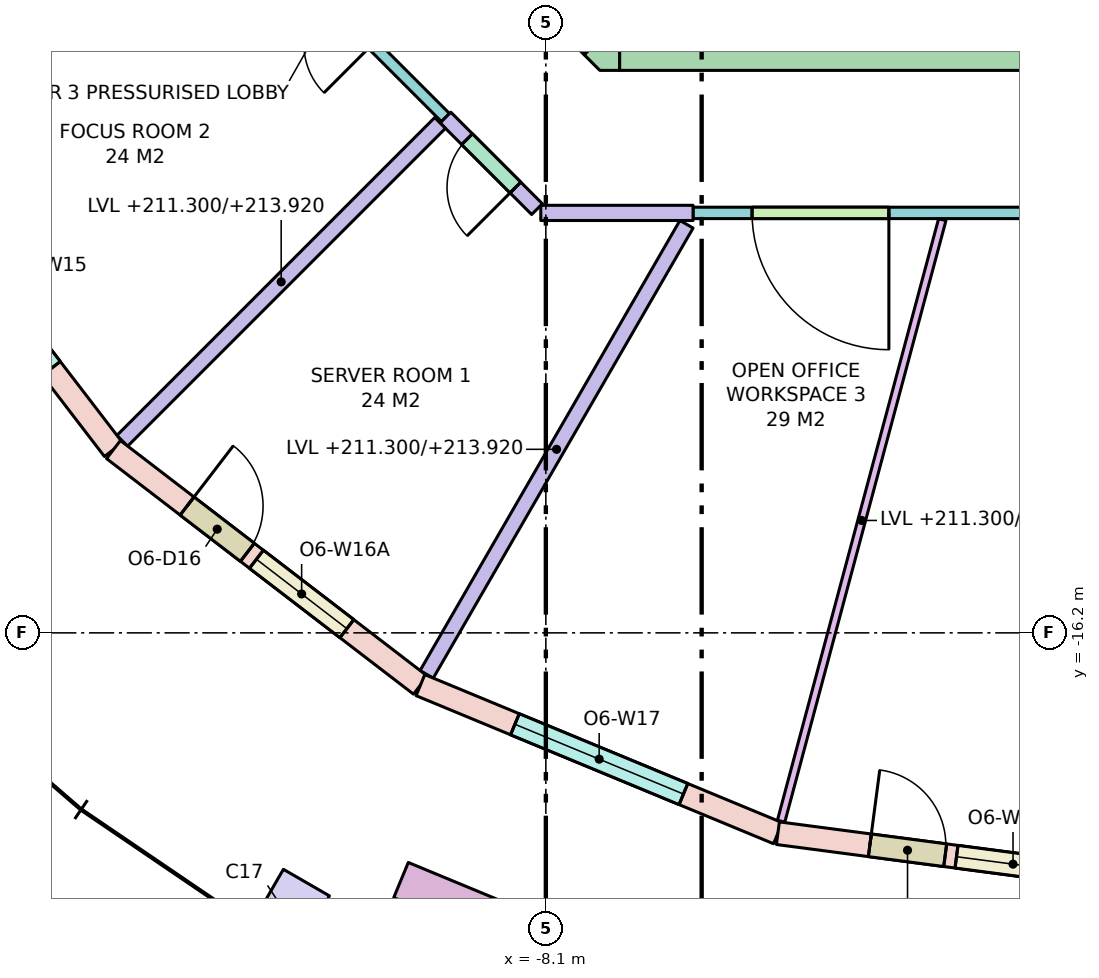
"""IFC4 building model, lengths in metres.
Left out: names, types, materials, properties, quantities, classifications, styles, units other than length and angle.
Written with IfcOpenShell. Run it as: python <this file> out.ifc"""

import sys

from ifc_helpers import new_model, si_unit, direction, frame, frame_2d, origin, origin_2d, place, context, subcontext, project, spatial, polyline, rectangle, outline, extrude, element, fill, save


model = new_model("IFC4")
c1 = context("Model", 3, precision=1e-05, world=origin(), true_north=direction((0.0, 1.0)))
c2 = subcontext(c1, "Body", "Model", "MODEL_VIEW")
j1 = project(units=[si_unit("LENGTHUNIT", "METRE"), si_unit("PLANEANGLEUNIT", "RADIAN")], contexts=[c1])
p1 = place(None, origin())
s1 = spatial("IfcSite", under=j1, at=p1, CompositionType="ELEMENT")
p2 = place(p1, origin())
s2 = spatial("IfcBuilding", under=s1, at=p2, CompositionType="ELEMENT")
p3 = place(p2, frame((0.0, 0.0, 211.3)))
s3 = spatial("IfcBuildingStorey", under=s2, at=p3, CompositionType="ELEMENT", Elevation=211.3)
p4 = place(p3, frame((-11.5, -19.919, 0.0), z_axis=(0.0, 0.0, 1.0), x_axis=(0.866025403784, -0.5, 0.0)))
e1 = element("IfcColumn", 1, at=p4, inside=s3, PredefinedType="COLUMN", context=c2, shape_type="SweptSolid", body=[
    extrude(rectangle(XDim=0.7, YDim=1.0, at=origin_2d()), origin(), (0.0, 0.0, 1.0), 3.7),
])
p5 = place(p3, frame((-7.13, -8.45, -0.28), z_axis=(0.0, 0.0, 1.0), x_axis=(1.0, 0.0, 0.0)))
e2 = element("IfcWall", 2, at=p5, inside=s3, PredefinedType="SHEAR", context=c2, shape_type="SweptSolid", body=[
    extrude(rectangle(XDim=14.26, YDim=0.7, at=frame_2d((7.13, 0.0))), origin(), (0.0, 0.0, 1.0), 3.7),
])
p6 = place(p5, frame((8.08, 0.0, 0.28)))
e3 = element("IfcOpeningElement", 3, at=p6, cuts=e2, PredefinedType="OPENING", context=c2, shape_type="SweptSolid", body=[
    extrude(rectangle(XDim=0.7, YDim=2.1, at=frame_2d((0.35, 1.05))), frame((0.0, 0.36, 0.0), z_axis=(0.0, -1.0, 0.0), x_axis=(1.0, 0.0, 0.0)), (0.0, 0.0, 1.0), 0.72),
])
p7 = place(p5, frame((5.58, 0.0, 0.28)))
e4 = element("IfcOpeningElement", 4, at=p7, cuts=e2, PredefinedType="OPENING", context=c2, shape_type="SweptSolid", body=[
    extrude(rectangle(XDim=0.85, YDim=2.1, at=frame_2d((0.425, 1.05))), frame((0.0, 0.36, 0.0), z_axis=(0.0, -1.0, 0.0), x_axis=(1.0, 0.0, 0.0)), (0.0, 0.0, 1.0), 0.72),
])
p8 = place(p5, frame((6.88, 0.0, 0.28)))
e5 = element("IfcOpeningElement", 5, at=p8, cuts=e2, PredefinedType="OPENING", context=c2, shape_type="SweptSolid", body=[
    extrude(rectangle(XDim=0.85, YDim=2.1, at=frame_2d((0.425, 1.05))), frame((0.0, 0.36, 0.0), z_axis=(0.0, -1.0, 0.0), x_axis=(1.0, 0.0, 0.0)), (0.0, 0.0, 1.0), 0.72),
])
p9 = place(p5, frame((9.521, 0.0, 0.28)))
e6 = element("IfcOpeningElement", 6, at=p9, cuts=e2, PredefinedType="OPENING", context=c2, shape_type="SweptSolid", body=[
    extrude(rectangle(XDim=0.9, YDim=2.1, at=frame_2d((0.45, 1.05))), frame((0.0, 0.36, 0.0), z_axis=(0.0, -1.0, 0.0), x_axis=(1.0, 0.0, 0.0)), (0.0, 0.0, 1.0), 0.72),
])
p10 = place(p5, frame((11.278, 0.0, 0.28)))
e7 = element("IfcOpeningElement", 7, at=p10, cuts=e2, PredefinedType="OPENING", context=c2, shape_type="SweptSolid", body=[
    extrude(rectangle(XDim=0.9, YDim=2.1, at=frame_2d((0.45, 1.05))), frame((0.0, 0.36, 0.0), z_axis=(0.0, -1.0, 0.0), x_axis=(1.0, 0.0, 0.0)), (0.0, 0.0, 1.0), 0.72),
])
p11 = place(p5, frame((12.84, 0.0, 0.28)))
e8 = element("IfcOpeningElement", 8, at=p11, cuts=e2, PredefinedType="OPENING", context=c2, shape_type="SweptSolid", body=[
    extrude(rectangle(XDim=0.9, YDim=2.1, at=frame_2d((0.45, 1.05))), frame((0.0, 0.36, 0.0), z_axis=(0.0, -1.0, 0.0), x_axis=(1.0, 0.0, 0.0)), (0.0, 0.0, 1.0), 0.72),
])
p12 = place(p3, frame((-7.347, -8.347, -0.28), z_axis=(0.0, 0.0, 1.0), x_axis=(-0.707106781187, 0.707106781187, 0.0)))
e9 = element("IfcWall", 9, at=p12, inside=s3, PredefinedType="SHEAR", context=c2, shape_type="SweptSolid", body=[
    extrude(rectangle(XDim=4.243, YDim=0.7, at=frame_2d((2.121, 0.0))), origin(), (0.0, 0.0, 1.0), 3.7),
])
p13 = place(p12, frame((2.393, 0.0, 0.28)))
e10 = element("IfcOpeningElement", 10, at=p13, cuts=e9, PredefinedType="OPENING", context=c2, shape_type="SweptSolid", body=[
    extrude(rectangle(XDim=1.2, YDim=2.1, at=frame_2d((0.6, 1.05))), frame((0.0, 0.36, 0.0), z_axis=(0.0, -1.0, 0.0), x_axis=(1.0, 0.0, 0.0)), (0.0, 0.0, 1.0), 0.72),
])
p14 = place(p3, frame((0.0, 0.0, -0.28)))
e11 = element("IfcWall", 11, at=p14, inside=s3, PredefinedType="SHEAR", context=c2, shape_type="SweptSolid", body=[
    extrude(outline(polyline([(-7.39, -8.8), (-7.595, -8.595), (-7.595, -8.595), (-7.595, -8.595), (-7.13, -8.13), (-7.13, -8.8), (-7.13, -8.8), (-7.39, -8.8)])), origin(), (0.0, 0.0, 1.0), 3.7),
])
p15 = place(p3, frame((-16.887, -9.75, 0.0), z_axis=(0.0, 0.0, 1.0), x_axis=(0.608757714995, -0.79335619014, 0.0)))
e12 = element("IfcWall", 12, at=p15, inside=s3, PredefinedType="STANDARD", context=c2, shape_type="SweptSolid", body=[
    extrude(rectangle(XDim=5.091, YDim=0.3, at=frame_2d((2.545, 0.0))), origin(), (0.0, 0.0, 1.0), 3.42),
])
p16 = place(p15, frame((1.345, 0.0, 0.8)))
e13 = element("IfcOpeningElement", 13, at=p16, cuts=e12, PredefinedType="OPENING", context=c2, shape_type="SweptSolid", body=[
    extrude(rectangle(XDim=2.4, YDim=2.4, at=frame_2d((1.2, 1.2))), frame((0.0, 0.16, 0.0), z_axis=(0.0, -1.0, 0.0), x_axis=(1.0, 0.0, 0.0)), (0.0, 0.0, 1.0), 0.32),
])
p17 = place(p3, frame((-13.789, -13.789, 0.0), z_axis=(0.0, 0.0, 1.0), x_axis=(0.79335619014, -0.608757714995, 0.0)))
e14 = element("IfcWall", 14, at=p17, inside=s3, PredefinedType="STANDARD", context=c2, shape_type="SweptSolid", body=[
    extrude(rectangle(XDim=5.091, YDim=0.3, at=frame_2d((2.545, 0.0))), origin(), (0.0, 0.0, 1.0), 3.42),
])
p18 = place(p17, frame((1.22, 0.0, 0.0)))
e15 = element("IfcOpeningElement", 15, at=p18, cuts=e14, PredefinedType="OPENING", context=c2, shape_type="SweptSolid", body=[
    extrude(rectangle(XDim=1.0, YDim=2.4, at=frame_2d((0.5, 1.2))), frame((0.0, 0.16, 0.0), z_axis=(0.0, -1.0, 0.0), x_axis=(1.0, 0.0, 0.0)), (0.0, 0.0, 1.0), 0.32),
])
p19 = place(p17, frame((2.37, 0.0, 0.8)))
e16 = element("IfcOpeningElement", 16, at=p19, cuts=e14, PredefinedType="OPENING", context=c2, shape_type="SweptSolid", body=[
    extrude(rectangle(XDim=1.5, YDim=2.4, at=frame_2d((0.75, 1.2))), frame((0.0, 0.16, 0.0), z_axis=(0.0, -1.0, 0.0), x_axis=(1.0, 0.0, 0.0)), (0.0, 0.0, 1.0), 0.32),
])
p20 = place(p3, frame((-9.75, -16.887, 0.0), z_axis=(0.0, 0.0, 1.0), x_axis=(0.923862504675, -0.382724538613, 0.0)))
e17 = element("IfcWall", 17, at=p20, inside=s3, PredefinedType="STANDARD", context=c2, shape_type="SweptSolid", body=[
    extrude(rectangle(XDim=5.091, YDim=0.3, at=frame_2d((2.545, 0.0))), origin(), (0.0, 0.0, 1.0), 3.42),
])
p21 = place(p20, frame((1.345, 0.0, 0.8)))
e18 = element("IfcOpeningElement", 18, at=p21, cuts=e17, PredefinedType="OPENING", context=c2, shape_type="SweptSolid", body=[
    extrude(rectangle(XDim=2.4, YDim=2.4, at=frame_2d((1.2, 1.2))), frame((0.0, 0.16, 0.0), z_axis=(0.0, -1.0, 0.0), x_axis=(1.0, 0.0, 0.0)), (0.0, 0.0, 1.0), 0.32),
])
p22 = place(p3, frame((-5.047, -18.836, 0.0), z_axis=(0.0, 0.0, 1.0), x_axis=(0.99144890792, -0.130495451964, 0.0)))
e19 = element("IfcWall", 19, at=p22, inside=s3, PredefinedType="STANDARD", context=c2, shape_type="SweptSolid", body=[
    extrude(rectangle(XDim=5.091, YDim=0.3, at=frame_2d((2.545, 0.0))), origin(), (0.0, 0.0, 1.0), 3.42),
])
p23 = place(p22, frame((1.22, 0.0, 0.0)))
e20 = element("IfcOpeningElement", 20, at=p23, cuts=e19, PredefinedType="OPENING", context=c2, shape_type="SweptSolid", body=[
    extrude(rectangle(XDim=1.0, YDim=2.4, at=frame_2d((0.5, 1.2))), frame((0.0, 0.16, 0.0), z_axis=(0.0, -1.0, 0.0), x_axis=(1.0, 0.0, 0.0)), (0.0, 0.0, 1.0), 0.32),
])
p24 = place(p22, frame((2.37, 0.0, 0.8)))
e21 = element("IfcOpeningElement", 21, at=p24, cuts=e19, PredefinedType="OPENING", context=c2, shape_type="SweptSolid", body=[
    extrude(rectangle(XDim=1.5, YDim=2.4, at=frame_2d((0.75, 1.2))), frame((0.0, 0.16, 0.0), z_axis=(0.0, -1.0, 0.0), x_axis=(1.0, 0.0, 0.0)), (0.0, 0.0, 1.0), 0.32),
])
p25 = place(p3, frame((-10.006, -19.452, 0.0), z_axis=(0.0, 0.0, 1.0), x_axis=(0.923885420167, -0.382669217998, 0.0)))
e22 = element("IfcWall", 22, at=p25, inside=s3, PredefinedType="PARAPET", context=c2, shape_type="SweptSolid", body=[
    extrude(rectangle(XDim=3.6, YDim=0.5, at=frame_2d((1.8, 0.0))), origin(), (0.0, 0.0, 1.0), 0.9),
])
p26 = place(p3, frame((8.167, -10.675, 0.0), z_axis=(0.0, 0.0, 1.0), x_axis=(-1.0, 0.0, 0.0)))
e23 = element("IfcWall", 23, at=p26, inside=s3, PredefinedType="PARTITIONING", context=c2, shape_type="SweptSolid", body=[
    extrude(rectangle(XDim=14.33, YDim=0.15, at=frame_2d((7.165, 0.0))), origin(), (0.0, 0.0, 1.0), 2.62),
])
p27 = place(p26, frame((7.267, 0.0, 0.0)))
e24 = element("IfcOpeningElement", 24, at=p27, cuts=e23, PredefinedType="OPENING", context=c2, shape_type="SweptSolid", body=[
    extrude(rectangle(XDim=1.8, YDim=2.1, at=frame_2d((0.9, 1.05))), frame((0.0, 0.085, 0.0), z_axis=(0.0, -1.0, 0.0), x_axis=(1.0, 0.0, 0.0)), (0.0, 0.0, 1.0), 0.17),
])
p28 = place(p26, frame((3.201, 0.0, 0.0)))
e25 = element("IfcOpeningElement", 25, at=p28, cuts=e23, PredefinedType="OPENING", context=c2, shape_type="SweptSolid", body=[
    extrude(rectangle(XDim=0.9, YDim=2.1, at=frame_2d((0.45, 1.05))), frame((0.0, 0.085, 0.0), z_axis=(0.0, -1.0, 0.0), x_axis=(1.0, 0.0, 0.0)), (0.0, 0.0, 1.0), 0.17),
])
p29 = place(p26, frame((11.753, 0.0, 0.0)))
e26 = element("IfcOpeningElement", 26, at=p29, cuts=e23, PredefinedType="OPENING", context=c2, shape_type="SweptSolid", body=[
    extrude(rectangle(XDim=1.8, YDim=2.1, at=frame_2d((0.9, 1.05))), frame((0.0, 0.085, 0.0), z_axis=(0.0, -1.0, 0.0), x_axis=(1.0, 0.0, 0.0)), (0.0, 0.0, 1.0), 0.17),
])
p30 = place(p3, frame((-6.163, -10.675, 0.0), z_axis=(0.0, 0.0, 1.0), x_axis=(-1.0, 0.0, 0.0)))
e27 = element("IfcWall", 27, at=p30, inside=s3, PredefinedType="PARTITIONING", context=c2, shape_type="SweptSolid", body=[
    extrude(rectangle(XDim=2.003, YDim=0.2, at=frame_2d((1.002, 0.0))), origin(), (0.0, 0.0, 1.0), 2.62),
])
p31 = place(p3, frame((-8.216, -10.625, 0.0), z_axis=(0.0, 0.0, 1.0), x_axis=(-0.70717842684, 0.707035128273, 0.0)))
e28 = element("IfcWall", 28, at=p31, inside=s3, PredefinedType="PARTITIONING", context=c2, shape_type="SweptSolid", body=[
    extrude(rectangle(XDim=1.704, YDim=0.2, at=frame_2d((0.852, 0.0))), origin(), (0.0, 0.0, 1.0), 2.62),
])
p32 = place(p31, frame((0.402, 0.0, 0.0)))
e29 = element("IfcOpeningElement", 29, at=p32, cuts=e28, PredefinedType="OPENING", context=c2, shape_type="SweptSolid", body=[
    extrude(rectangle(XDim=0.9, YDim=2.1, at=frame_2d((0.45, 1.05))), frame((0.0, 0.11, 0.0), z_axis=(0.0, -1.0, 0.0), x_axis=(1.0, 0.0, 0.0)), (0.0, 0.0, 1.0), 0.22),
])
p33 = place(p3, frame((-9.421, -9.421, 0.0), z_axis=(0.0, 0.0, 1.0), x_axis=(-0.707079950597, 0.707133610758, 0.0)))
e30 = element("IfcWall", 30, at=p33, inside=s3, PredefinedType="PARTITIONING", context=c2, shape_type="SweptSolid", body=[
    extrude(rectangle(XDim=4.55, YDim=0.15, at=frame_2d((2.275, 0.0))), origin(), (0.0, 0.0, 1.0), 2.62),
])
p34 = place(p33, frame((1.361, 0.0, 0.0)))
e31 = element("IfcOpeningElement", 31, at=p34, cuts=e30, PredefinedType="OPENING", context=c2, shape_type="SweptSolid", body=[
    extrude(rectangle(XDim=0.9, YDim=2.1, at=frame_2d((0.45, 1.05))), frame((0.0, 0.085, 0.0), z_axis=(0.0, -1.0, 0.0), x_axis=(1.0, 0.0, 0.0)), (0.0, 0.0, 1.0), 0.17),
])
p35 = place(p3, frame((-12.025, -6.943, 0.0), z_axis=(0.0, 0.0, 1.0), x_axis=(-0.866029712004, -0.499992537871, 0.0)))
e32 = element("IfcWall", 32, at=p35, inside=s3, PredefinedType="PARTITIONING", context=c2, shape_type="SweptSolid", body=[
    extrude(rectangle(XDim=5.451, YDim=0.1, at=frame_2d((2.726, 0.0))), origin(), (0.0, 0.0, 1.0), 2.62),
])
p36 = place(p3, frame((-9.491, -9.491, 0.0), z_axis=(0.0, 0.0, 1.0), x_axis=(-0.707106781187, -0.707106781187, 0.0)))
e33 = element("IfcWall", 33, at=p36, inside=s3, PredefinedType="PARTITIONING", context=c2, shape_type="SweptSolid", body=[
    extrude(rectangle(XDim=5.914, YDim=0.2, at=frame_2d((2.957, 0.0))), origin(), (0.0, 0.0, 1.0), 2.62),
])
p37 = place(p3, frame((-6.25, -10.824, 0.0), z_axis=(0.0, 0.0, 1.0), x_axis=(-0.500009887181, -0.866019695343, 0.0)))
e34 = element("IfcWall", 34, at=p37, inside=s3, PredefinedType="PARTITIONING", context=c2, shape_type="SweptSolid", body=[
    extrude(rectangle(XDim=6.838, YDim=0.2, at=frame_2d((3.419, 0.0))), origin(), (0.0, 0.0, 1.0), 2.62),
])
p38 = place(p3, frame((-2.884, -10.764, 0.0), z_axis=(0.0, 0.0, 1.0), x_axis=(-0.258818011497, -0.965926103242, 0.0)))
e35 = element("IfcWall", 35, at=p38, inside=s3, PredefinedType="PARTITIONING", context=c2, shape_type="SweptSolid", body=[
    extrude(rectangle(XDim=8.192, YDim=0.1, at=frame_2d((4.096, 0.0))), origin(), (0.0, 0.0, 1.0), 2.62),
])
p39 = place(p16, origin())
e36 = element("IfcWindow", 36, at=p39, inside=s3, PartitioningType="SINGLE_PANEL", PredefinedType="WINDOW", context=c2, shape_type="SweptSolid", body=[
    extrude(rectangle(XDim=2.4, YDim=2.4, at=frame_2d((1.2, 1.2))), frame((0.0, 0.03, 0.0), z_axis=(0.0, -1.0, 0.0), x_axis=(1.0, 0.0, 0.0)), (0.0, 0.0, 1.0), 0.06),
])
fill(e13, e36)
p40 = place(p18, origin())
e37 = element("IfcDoor", 37, at=p40, inside=s3, OperationType="SINGLE_SWING_LEFT", PredefinedType="DOOR", context=c2, shape_type="SweptSolid", body=[
    extrude(rectangle(XDim=1.0, YDim=2.4, at=frame_2d((0.5, 1.2))), frame((0.0, 0.025, 0.0), z_axis=(0.0, -1.0, 0.0), x_axis=(1.0, 0.0, 0.0)), (0.0, 0.0, 1.0), 0.05),
])
fill(e15, e37)
p41 = place(p19, origin())
e38 = element("IfcWindow", 38, at=p41, inside=s3, PartitioningType="SINGLE_PANEL", PredefinedType="WINDOW", context=c2, shape_type="SweptSolid", body=[
    extrude(rectangle(XDim=1.5, YDim=2.4, at=frame_2d((0.75, 1.2))), frame((0.0, 0.03, 0.0), z_axis=(0.0, -1.0, 0.0), x_axis=(1.0, 0.0, 0.0)), (0.0, 0.0, 1.0), 0.06),
])
fill(e16, e38)
p42 = place(p21, origin())
e39 = element("IfcWindow", 39, at=p42, inside=s3, PartitioningType="SINGLE_PANEL", PredefinedType="WINDOW", context=c2, shape_type="SweptSolid", body=[
    extrude(rectangle(XDim=2.4, YDim=2.4, at=frame_2d((1.2, 1.2))), frame((0.0, 0.03, 0.0), z_axis=(0.0, -1.0, 0.0), x_axis=(1.0, 0.0, 0.0)), (0.0, 0.0, 1.0), 0.06),
])
fill(e18, e39)
p43 = place(p23, origin())
e40 = element("IfcDoor", 40, at=p43, inside=s3, OperationType="SINGLE_SWING_LEFT", PredefinedType="DOOR", context=c2, shape_type="SweptSolid", body=[
    extrude(rectangle(XDim=1.0, YDim=2.4, at=frame_2d((0.5, 1.2))), frame((0.0, 0.025, 0.0), z_axis=(0.0, -1.0, 0.0), x_axis=(1.0, 0.0, 0.0)), (0.0, 0.0, 1.0), 0.05),
])
fill(e20, e40)
p44 = place(p24, origin())
e41 = element("IfcWindow", 41, at=p44, inside=s3, PartitioningType="SINGLE_PANEL", PredefinedType="WINDOW", context=c2, shape_type="SweptSolid", body=[
    extrude(rectangle(XDim=1.5, YDim=2.4, at=frame_2d((0.75, 1.2))), frame((0.0, 0.03, 0.0), z_axis=(0.0, -1.0, 0.0), x_axis=(1.0, 0.0, 0.0)), (0.0, 0.0, 1.0), 0.06),
])
fill(e21, e41)
p45 = place(p32, origin())
e42 = element("IfcDoor", 42, at=p45, inside=s3, OperationType="SINGLE_SWING_LEFT", PredefinedType="DOOR", context=c2, shape_type="SweptSolid", body=[
    extrude(rectangle(XDim=0.9, YDim=2.1, at=frame_2d((0.45, 1.05))), frame((0.0, 0.025, 0.0), z_axis=(0.0, -1.0, 0.0), x_axis=(1.0, 0.0, 0.0)), (0.0, 0.0, 1.0), 0.05),
])
fill(e29, e42)
p46 = place(p29, origin())
e43 = element("IfcDoor", 43, at=p46, inside=s3, OperationType="DOUBLE_DOOR_SINGLE_SWING", PredefinedType="DOOR", context=c2, shape_type="SweptSolid", body=[
    extrude(rectangle(XDim=1.8, YDim=2.1, at=frame_2d((0.9, 1.05))), frame((0.0, 0.025, 0.0), z_axis=(0.0, -1.0, 0.0), x_axis=(1.0, 0.0, 0.0)), (0.0, 0.0, 1.0), 0.05),
])
fill(e26, e43)
save(model, sys.argv[1])
